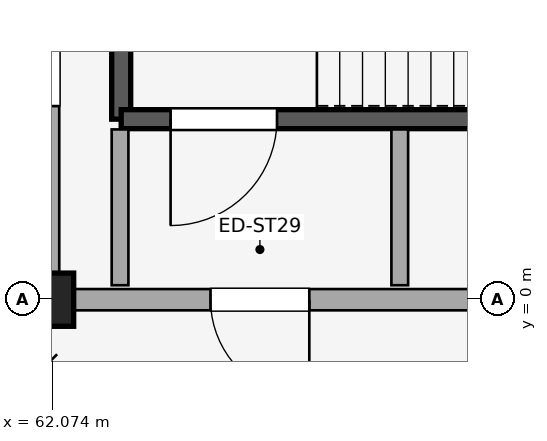
"""IFC4 building model, lengths in metres.
Left out: names, types, materials, properties, quantities, classifications, styles, units other than length and angle.
Written with IfcOpenShell. Run it as: python <this file> out.ifc"""

import sys

from ifc_helpers import new_model, si_unit, direction, frame, frame_2d, origin, origin_2d, place, context, subcontext, project, spatial, rectangle, extrude, element, fill, save


model = new_model("IFC4")
c1 = context("Model", 3, precision=1e-05, world=origin(), true_north=direction((0.0, 1.0)))
c2 = subcontext(c1, "Body", "Model", "MODEL_VIEW")
j1 = project(units=[si_unit("LENGTHUNIT", "METRE"), si_unit("PLANEANGLEUNIT", "RADIAN")], contexts=[c1])
p1 = place(None, origin())
s1 = spatial("IfcSite", under=j1, at=p1, CompositionType="ELEMENT")
p2 = place(p1, origin())
s2 = spatial("IfcBuilding", under=s1, at=p2, CompositionType="ELEMENT")
p3 = place(p2, origin())
s3 = spatial("IfcBuildingStorey", under=s2, at=p3, CompositionType="ELEMENT", Elevation=0.0)
p4 = place(p3, frame((62.0, 0.0, 0.0), z_axis=(0.0, 0.0, 1.0), x_axis=(1.0, 0.0, 0.0)))
e1 = element("IfcColumn", 1, at=p4, inside=s3, PredefinedType="COLUMN", context=c2, shape_type="SweptSolid", body=[
    extrude(rectangle(XDim=0.7, YDim=0.7, at=origin_2d()), origin(), (0.0, 0.0, 1.0), 5.4),
])
p5 = place(p3, frame((62.347, 0.0, 0.0), z_axis=(0.0, 0.0, 1.0), x_axis=(1.0, 0.0, 0.0)))
e2 = element("IfcWall", 2, at=p5, inside=s3, PredefinedType="STANDARD", context=c2, shape_type="SweptSolid", body=[
    extrude(rectangle(XDim=11.806, YDim=0.28, at=frame_2d((5.903, 0.0))), origin(), (0.0, 0.0, 1.0), 4.48),
])
p6 = place(p5, frame((1.803, 0.0, 0.0)))
e3 = element("IfcOpeningElement", 3, at=p6, cuts=e2, PredefinedType="OPENING", context=c2, shape_type="SweptSolid", body=[
    extrude(rectangle(XDim=1.3, YDim=2.2, at=frame_2d((0.65, 1.1))), frame((0.0, 0.15, 0.0), z_axis=(0.0, -1.0, 0.0), x_axis=(1.0, 0.0, 0.0)), (0.0, 0.0, 1.0), 0.3),
])
p7 = place(p5, frame((6.55, 0.0, 0.0)))
e4 = element("IfcOpeningElement", 4, at=p7, cuts=e2, PredefinedType="OPENING", context=c2, shape_type="SweptSolid", body=[
    extrude(rectangle(XDim=2.7, YDim=2.7, at=frame_2d((1.35, 1.35))), frame((0.0, 0.15, 0.0), z_axis=(0.0, -1.0, 0.0), x_axis=(1.0, 0.0, 0.0)), (0.0, 0.0, 1.0), 0.3),
])
p8 = place(p3, frame((62.0, 0.347, 0.0), z_axis=(0.0, 0.0, 1.0), x_axis=(0.0, 1.0, 0.0)))
e5 = element("IfcWall", 5, at=p8, inside=s3, PredefinedType="STANDARD", context=c2, shape_type="SweptSolid", body=[
    extrude(rectangle(XDim=10.406, YDim=0.32, at=frame_2d((5.203, 0.0))), origin(), (0.0, 0.0, 1.0), 4.48),
])
p9 = place(p8, frame((7.6, 0.0, 0.0)))
e6 = element("IfcOpeningElement", 6, at=p9, cuts=e5, PredefinedType="OPENING", context=c2, shape_type="SweptSolid", body=[
    extrude(rectangle(XDim=1.3, YDim=2.2, at=frame_2d((0.65, 1.1))), frame((0.0, 0.17, 0.0), z_axis=(0.0, -1.0, 0.0), x_axis=(1.0, 0.0, 0.0)), (0.0, 0.0, 1.0), 0.34),
])
p10 = place(p8, frame((2.2, 0.0, 0.0)))
e7 = element("IfcOpeningElement", 7, at=p10, cuts=e5, PredefinedType="OPENING", context=c2, shape_type="SweptSolid", body=[
    extrude(rectangle(XDim=2.4, YDim=2.4, at=frame_2d((1.2, 1.2))), frame((0.0, 0.17, 0.0), z_axis=(0.0, -1.0, 0.0), x_axis=(1.0, 0.0, 0.0)), (0.0, 0.0, 1.0), 0.34),
])
p11 = place(p3, frame((62.975, 7.625, 0.0), z_axis=(0.0, 0.0, 1.0), x_axis=(0.0, -1.0, 0.0)))
e8 = element("IfcWall", 8, at=p11, inside=s3, PredefinedType="SHEAR", context=c2, shape_type="SweptSolid", body=[
    extrude(rectangle(XDim=5.25, YDim=0.25, at=frame_2d((2.625, 0.0))), origin(), (0.0, 0.0, 1.0), 5.1),
])
p12 = place(p3, frame((62.975, 2.375, 0.0), z_axis=(0.0, 0.0, 1.0), x_axis=(1.0, 0.0, 0.0)))
e9 = element("IfcWall", 9, at=p12, inside=s3, PredefinedType="SHEAR", context=c2, shape_type="SweptSolid", body=[
    extrude(rectangle(XDim=10.45, YDim=0.25, at=frame_2d((5.225, 0.0))), origin(), (0.0, 0.0, 1.0), 5.1),
])
p13 = place(p12, frame((0.65, 0.0, 0.0)))
e10 = element("IfcOpeningElement", 10, at=p13, cuts=e9, PredefinedType="OPENING", context=c2, shape_type="SweptSolid", body=[
    extrude(rectangle(XDim=1.4, YDim=2.2, at=frame_2d((0.7, 1.1))), frame((0.0, 0.135, 0.0), z_axis=(0.0, -1.0, 0.0), x_axis=(1.0, 0.0, 0.0)), (0.0, 0.0, 1.0), 0.27),
])
for number, where, z_axis, x_axis in (
    (11, (62.96, 0.19, 0.0), (0.0, 0.0, 1.0), (0.0, 1.0, 0.0)),
    (12, (66.64, 0.19, 0.0), (0.0, 0.0, 1.0), (0.0, 1.0, 0.0)),
):
    element("IfcWall", number, at=place(p3, frame(where, z_axis=z_axis, x_axis=x_axis)), inside=s3, PredefinedType="PARTITIONING", context=c2, shape_type="SweptSolid", body=[
        extrude(rectangle(XDim=2.05, YDim=0.22, at=frame_2d((1.025, 0.0))), origin(), (0.0, 0.0, 1.0), 3.69),
    ])
p14 = place(p6, frame((1.3, 0.0, 0.0), z_axis=(0.0, 0.0, 1.0), x_axis=(-1.0, 0.0, 0.0)))
e13 = element("IfcDoor", 13, at=p14, inside=s3, OperationType="SINGLE_SWING_LEFT", PredefinedType="DOOR", context=c2, shape_type="SweptSolid", body=[
    extrude(rectangle(XDim=1.3, YDim=2.2, at=frame_2d((0.65, 1.1))), frame((0.0, 0.025, 0.0), z_axis=(0.0, -1.0, 0.0), x_axis=(1.0, 0.0, 0.0)), (0.0, 0.0, 1.0), 0.05),
])
fill(e3, e13)
p15 = place(p13, frame((1.4, 0.0, 0.0), z_axis=(0.0, 0.0, 1.0), x_axis=(-1.0, 0.0, 0.0)))
e14 = element("IfcDoor", 14, at=p15, inside=s3, OperationType="SINGLE_SWING_RIGHT", PredefinedType="DOOR", context=c2, shape_type="SweptSolid", body=[
    extrude(rectangle(XDim=1.4, YDim=2.2, at=frame_2d((0.7, 1.1))), frame((0.0, 0.025, 0.0), z_axis=(0.0, -1.0, 0.0), x_axis=(1.0, 0.0, 0.0)), (0.0, 0.0, 1.0), 0.05),
])
fill(e10, e14)
save(model, sys.argv[1])
